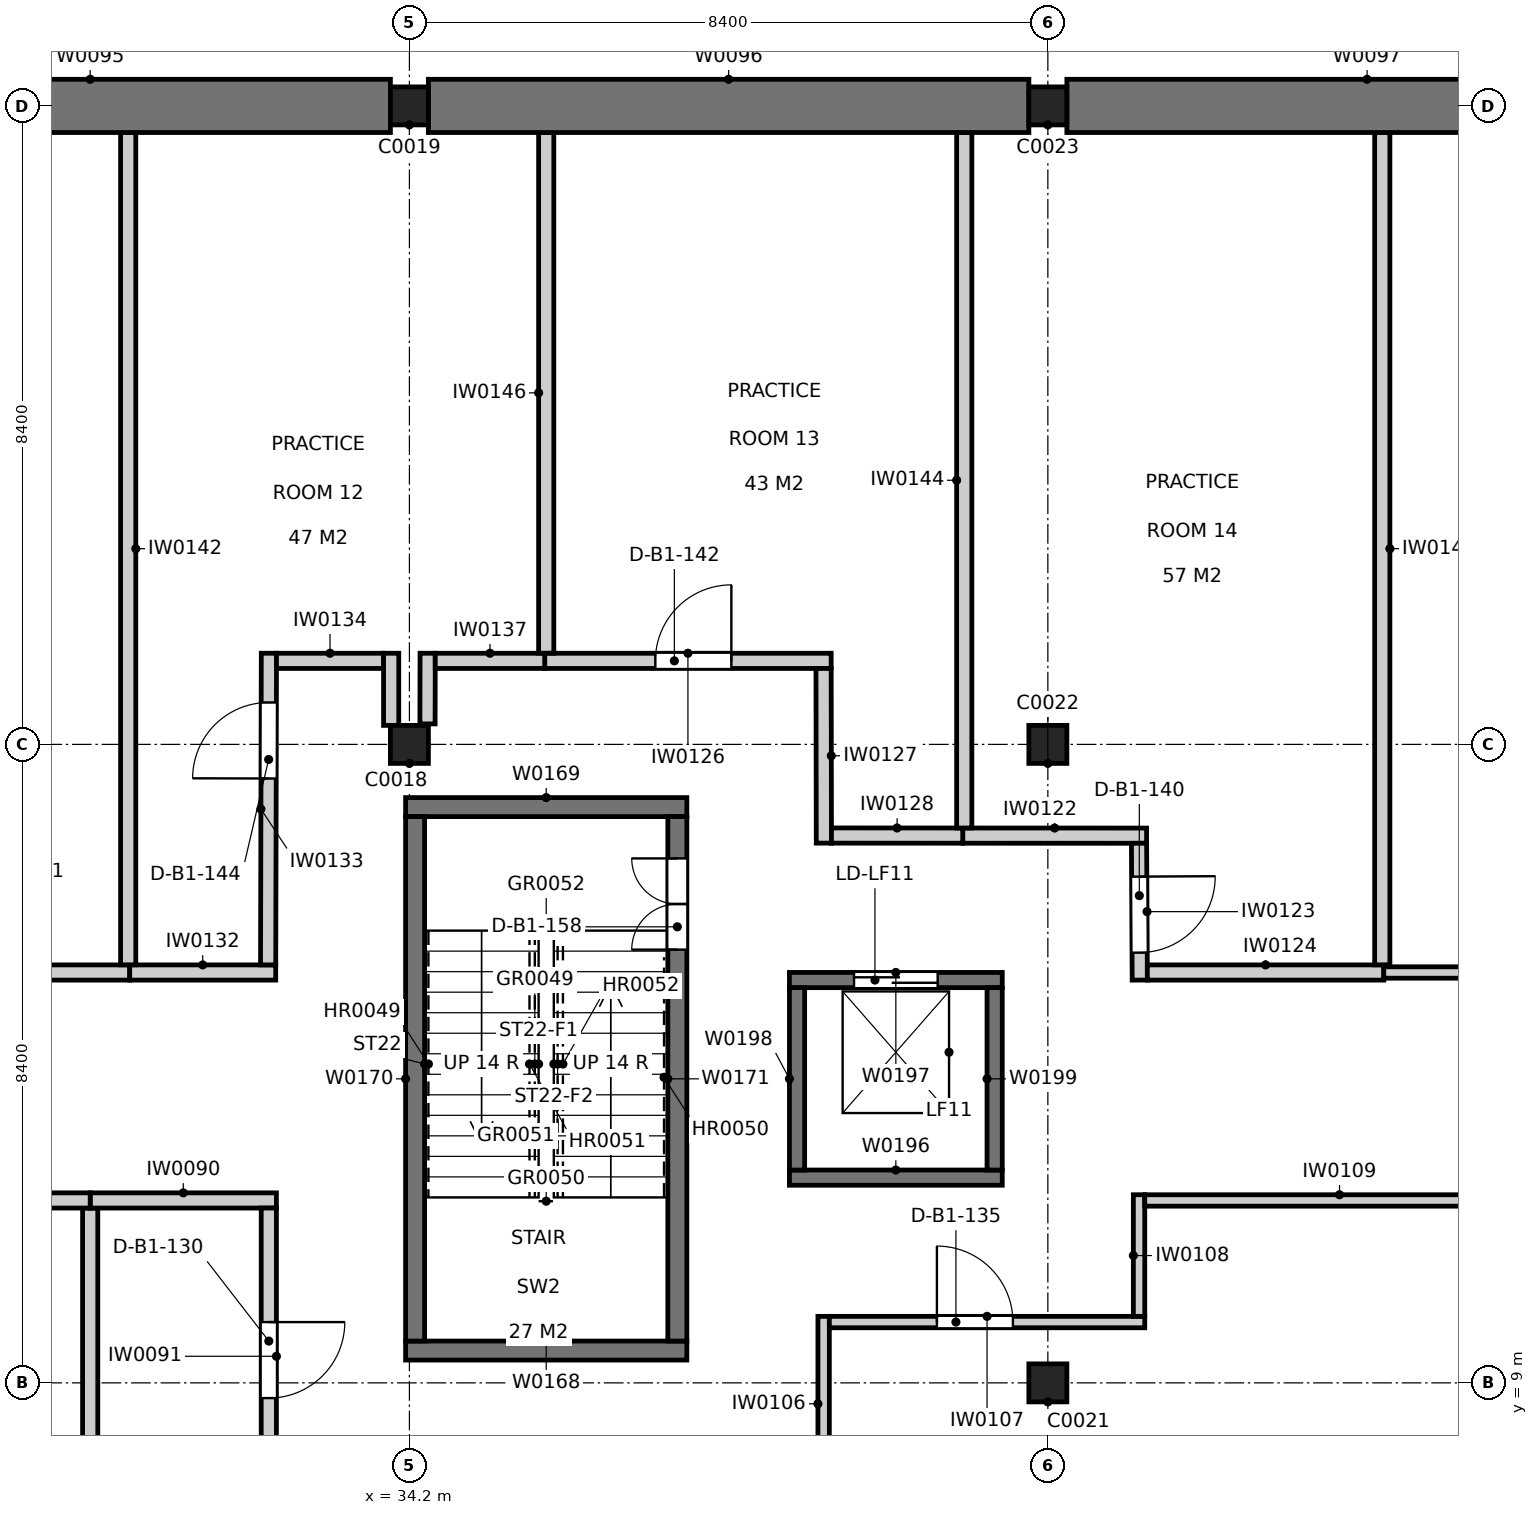
"""IFC4 building model, lengths in metres.
Left out: names, types, materials, properties, quantities, classifications, styles, units other than length and angle.
Written with IfcOpenShell. Run it as: python <this file> out.ifc"""

import sys

from ifc_helpers import new_model, si_unit, direction, frame, frame_2d, origin, origin_2d, place, context, subcontext, project, spatial, rectangle, extrude, element, fill, save


model = new_model("IFC4")
c1 = context("Model", 3, precision=1e-05, world=origin(), true_north=direction((0.0, 1.0)))
c2 = subcontext(c1, "Body", "Model", "MODEL_VIEW")
j1 = project(units=[si_unit("LENGTHUNIT", "METRE"), si_unit("PLANEANGLEUNIT", "RADIAN")], contexts=[c1])
p1 = place(None, origin())
s1 = spatial("IfcSite", under=j1, at=p1, CompositionType="ELEMENT")
p2 = place(p1, origin())
s2 = spatial("IfcBuilding", under=s1, at=p2, CompositionType="ELEMENT")
p3 = place(p2, frame((0.0, 0.0, -5.0)))
s3 = spatial("IfcBuildingStorey", under=s2, at=p3, CompositionType="ELEMENT", Elevation=-5.0)
for number, where, z_axis, x_axis in (
    (1, (34.2, 17.4, -0.5), (0.0, 0.0, 1.0), (1.0, 0.0, 0.0)),
    (2, (34.2, 25.8, -0.5), (0.0, 0.0, 1.0), (1.0, 0.0, 0.0)),
    (3, (42.6, 9.0, -0.5), (0.0, 0.0, 1.0), (1.0, 0.0, 0.0)),
    (4, (42.6, 17.4, -0.5), (0.0, 0.0, 1.0), (1.0, 0.0, 0.0)),
    (5, (42.6, 25.8, -0.5), (0.0, 0.0, 1.0), (1.0, 0.0, 0.0)),
):
    element("IfcColumn", number, at=place(p3, frame(where, z_axis=z_axis, x_axis=x_axis)), inside=s3, PredefinedType="COLUMN", context=c2, shape_type="SweptSolid", body=[
        extrude(rectangle(XDim=0.5, YDim=0.5, at=origin_2d()), origin(), (0.0, 0.0, 1.0), 5.5),
    ])
p4 = place(p3, frame((26.05, 25.8, 0.0), z_axis=(0.0, 0.0, 1.0), x_axis=(1.0, 0.0, 0.0)))
e6 = element("IfcWall", 6, at=p4, inside=s3, PredefinedType="SOLIDWALL", context=c2, shape_type="SweptSolid", body=[
    extrude(rectangle(XDim=7.9, YDim=0.7, at=frame_2d((3.95, 0.0))), origin(), (0.0, 0.0, 1.0), 5.0),
])
p5 = place(p3, frame((34.45, 25.8, 0.0), z_axis=(0.0, 0.0, 1.0), x_axis=(1.0, 0.0, 0.0)))
e7 = element("IfcWall", 7, at=p5, inside=s3, PredefinedType="SOLIDWALL", context=c2, shape_type="SweptSolid", body=[
    extrude(rectangle(XDim=7.9, YDim=0.7, at=frame_2d((3.95, 0.0))), origin(), (0.0, 0.0, 1.0), 5.0),
])
p6 = place(p3, frame((42.85, 25.8, 0.0), z_axis=(0.0, 0.0, 1.0), x_axis=(1.0, 0.0, 0.0)))
e8 = element("IfcWall", 8, at=p6, inside=s3, PredefinedType="SOLIDWALL", context=c2, shape_type="SweptSolid", body=[
    extrude(rectangle(XDim=7.9, YDim=0.7, at=frame_2d((3.95, 0.0))), origin(), (0.0, 0.0, 1.0), 5.0),
])
for number, where, z_axis, x_axis in (
    (9, (34.15, 9.425, 0.0), (0.0, 0.0, 1.0), (1.0, 0.0, 0.0)),
    (10, (34.15, 16.575, 0.0), (0.0, 0.0, 1.0), (1.0, 0.0, 0.0)),
):
    element("IfcWall", number, at=place(p3, frame(where, z_axis=z_axis, x_axis=x_axis)), inside=s3, PredefinedType="SOLIDWALL", context=c2, shape_type="SweptSolid", body=[
        extrude(rectangle(XDim=3.7, YDim=0.25, at=frame_2d((1.85, 0.0))), origin(), (0.0, 0.0, 1.0), 5.0),
    ])
p7 = place(p3, frame((34.275, 9.55, 0.0), z_axis=(0.0, 0.0, 1.0), x_axis=(0.0, 1.0, 0.0)))
e11 = element("IfcWall", 11, at=p7, inside=s3, PredefinedType="SOLIDWALL", context=c2, shape_type="SweptSolid", body=[
    extrude(rectangle(XDim=6.9, YDim=0.25, at=frame_2d((3.45, 0.0))), origin(), (0.0, 0.0, 1.0), 5.0),
])
p8 = place(p3, frame((37.725, 9.55, 0.0), z_axis=(0.0, 0.0, 1.0), x_axis=(0.0, 1.0, 0.0)))
e12 = element("IfcWall", 12, at=p8, inside=s3, PredefinedType="SOLIDWALL", context=c2, shape_type="SweptSolid", body=[
    extrude(rectangle(XDim=6.9, YDim=0.25, at=frame_2d((3.45, 0.0))), origin(), (0.0, 0.0, 1.0), 5.0),
])
p9 = place(p8, frame((5.15, 0.0, 0.0)))
e13 = element("IfcOpeningElement", 13, at=p9, cuts=e12, PredefinedType="OPENING", context=c2, shape_type="SweptSolid", body=[
    extrude(rectangle(XDim=1.2, YDim=2.1, at=frame_2d((0.6, 1.05))), frame((0.0, 0.135, 0.0), z_axis=(0.0, -1.0, 0.0), x_axis=(1.0, 0.0, 0.0)), (0.0, 0.0, 1.0), 0.27),
])
p10 = place(p3, frame((39.2, 11.7, -1.4), z_axis=(0.0, 0.0, 1.0), x_axis=(1.0, 0.0, 0.0)))
e14 = element("IfcWall", 14, at=p10, inside=s3, PredefinedType="SOLIDWALL", context=c2, shape_type="SweptSolid", body=[
    extrude(rectangle(XDim=2.8, YDim=0.2, at=frame_2d((1.4, 0.0))), origin(), (0.0, 0.0, 1.0), 6.4),
])
p11 = place(p3, frame((39.2, 14.3, -1.4), z_axis=(0.0, 0.0, 1.0), x_axis=(1.0, 0.0, 0.0)))
e15 = element("IfcWall", 15, at=p11, inside=s3, PredefinedType="SOLIDWALL", context=c2, shape_type="SweptSolid", body=[
    extrude(rectangle(XDim=2.8, YDim=0.2, at=frame_2d((1.4, 0.0))), origin(), (0.0, 0.0, 1.0), 6.4),
])
p12 = place(p11, frame((0.85, 0.0, 1.4)))
e16 = element("IfcOpeningElement", 16, at=p12, cuts=e15, PredefinedType="OPENING", context=c2, shape_type="SweptSolid", body=[
    extrude(rectangle(XDim=1.1, YDim=2.1, at=frame_2d((0.55, 1.05))), frame((0.0, 0.11, 0.0), z_axis=(0.0, -1.0, 0.0), x_axis=(1.0, 0.0, 0.0)), (0.0, 0.0, 1.0), 0.22),
])
for number, where, z_axis, x_axis in (
    (17, (39.3, 11.8, -1.4), (0.0, 0.0, 1.0), (0.0, 1.0, 0.0)),
    (18, (41.9, 11.8, -1.4), (0.0, 0.0, 1.0), (0.0, 1.0, 0.0)),
):
    element("IfcWall", number, at=place(p3, frame(where, z_axis=z_axis, x_axis=x_axis)), inside=s3, PredefinedType="SOLIDWALL", context=c2, shape_type="SweptSolid", body=[
        extrude(rectangle(XDim=2.4, YDim=0.2, at=frame_2d((1.2, 0.0))), origin(), (0.0, 0.0, 1.0), 6.4),
    ])
p13 = place(p3, frame((30.0, 0.95, 0.0), z_axis=(0.0, 0.0, 1.0), x_axis=(0.0, 1.0, 0.0)))
e19 = element("IfcWall", 19, at=p13, inside=s3, PredefinedType="PARTITIONING", context=c2, shape_type="SweptSolid", body=[
    extrude(rectangle(XDim=10.35, YDim=0.2, at=frame_2d((5.175, 0.0))), origin(), (0.0, 0.0, 1.0), 4.04),
])
p14 = place(p3, frame((30.0, 11.4, 0.0), z_axis=(0.0, 0.0, 1.0), x_axis=(1.0, 0.0, 0.0)))
e20 = element("IfcWall", 20, at=p14, inside=s3, PredefinedType="PARTITIONING", context=c2, shape_type="SweptSolid", body=[
    extrude(rectangle(XDim=2.45, YDim=0.2, at=frame_2d((1.225, 0.0))), origin(), (0.0, 0.0, 1.0), 4.84),
])
p15 = place(p3, frame((32.35, 11.3, 0.0), z_axis=(0.0, 0.0, 1.0), x_axis=(0.0, -1.0, 0.0)))
e21 = element("IfcWall", 21, at=p15, inside=s3, PredefinedType="PARTITIONING", context=c2, shape_type="SweptSolid", body=[
    extrude(rectangle(XDim=3.9, YDim=0.2, at=frame_2d((1.95, 0.0))), origin(), (0.0, 0.0, 1.0), 4.04),
])
p16 = place(p15, frame((1.5, 0.0, 0.0)))
e22 = element("IfcOpeningElement", 22, at=p16, cuts=e21, PredefinedType="OPENING", context=c2, shape_type="SweptSolid", body=[
    extrude(rectangle(XDim=1.0, YDim=2.1, at=frame_2d((0.5, 1.05))), frame((0.0, 0.11, 0.0), z_axis=(0.0, -1.0, 0.0), x_axis=(1.0, 0.0, 0.0)), (0.0, 0.0, 1.0), 0.22),
])
p17 = place(p3, frame((25.0, 11.4, 0.0), z_axis=(0.0, 0.0, 1.0), x_axis=(1.0, 0.0, 0.0)))
e23 = element("IfcWall", 23, at=p17, inside=s3, PredefinedType="PARTITIONING", context=c2, shape_type="SweptSolid", body=[
    extrude(rectangle(XDim=5.0, YDim=0.2, at=frame_2d((2.5, 0.0))), origin(), (0.0, 0.0, 1.0), 4.04),
])
p18 = place(p17, frame((1.99, 0.0, 0.0)))
e24 = element("IfcOpeningElement", 24, at=p18, cuts=e23, PredefinedType="OPENING", context=c2, shape_type="SweptSolid", body=[
    extrude(rectangle(XDim=1.0, YDim=2.1, at=frame_2d((0.5, 1.05))), frame((0.0, 0.11, 0.0), z_axis=(0.0, -1.0, 0.0), x_axis=(1.0, 0.0, 0.0)), (0.0, 0.0, 1.0), 0.22),
])
p19 = place(p3, frame((39.65, 7.575, 0.0), z_axis=(0.0, 0.0, 1.0), x_axis=(0.0, 1.0, 0.0)))
e25 = element("IfcWall", 25, at=p19, inside=s3, PredefinedType="PARTITIONING", context=c2, shape_type="SweptSolid", body=[
    extrude(rectangle(XDim=2.3, YDim=0.15, at=frame_2d((1.15, 0.0))), origin(), (0.0, 0.0, 1.0), 4.04),
])
p20 = place(p3, frame((39.725, 9.8, 0.0), z_axis=(0.0, 0.0, 1.0), x_axis=(1.0, 0.0, 0.0)))
e26 = element("IfcWall", 26, at=p20, inside=s3, PredefinedType="PARTITIONING", context=c2, shape_type="SweptSolid", body=[
    extrude(rectangle(XDim=4.15, YDim=0.15, at=frame_2d((2.075, 0.0))), origin(), (0.0, 0.0, 1.0), 4.04),
])
p21 = place(p20, frame((1.415, 0.0, 0.0)))
e27 = element("IfcOpeningElement", 27, at=p21, cuts=e26, PredefinedType="OPENING", context=c2, shape_type="SweptSolid", body=[
    extrude(rectangle(XDim=1.0, YDim=2.1, at=frame_2d((0.5, 1.05))), frame((0.0, 0.085, 0.0), z_axis=(0.0, -1.0, 0.0), x_axis=(1.0, 0.0, 0.0)), (0.0, 0.0, 1.0), 0.17),
])
p22 = place(p3, frame((43.8, 9.875, 0.0), z_axis=(0.0, 0.0, 1.0), x_axis=(0.0, 1.0, 0.0)))
e28 = element("IfcWall", 28, at=p22, inside=s3, PredefinedType="PARTITIONING", context=c2, shape_type="SweptSolid", body=[
    extrude(rectangle(XDim=1.6, YDim=0.15, at=frame_2d((0.8, 0.0))), origin(), (0.0, 0.0, 1.0), 4.84),
])
p23 = place(p3, frame((43.875, 11.4, 0.0), z_axis=(0.0, 0.0, 1.0), x_axis=(1.0, 0.0, 0.0)))
e29 = element("IfcWall", 29, at=p23, inside=s3, PredefinedType="PARTITIONING", context=c2, shape_type="SweptSolid", body=[
    extrude(rectangle(XDim=5.125, YDim=0.15, at=frame_2d((2.562, 0.0))), origin(), (0.0, 0.0, 1.0), 4.84),
])
p24 = place(p3, frame((25.02, 14.399, 0.0), z_axis=(0.0, 0.0, 1.0), x_axis=(1.0, 0.0, 0.0)))
e30 = element("IfcWall", 30, at=p24, inside=s3, PredefinedType="PARTITIONING", context=c2, shape_type="SweptSolid", body=[
    extrude(rectangle(XDim=5.5, YDim=0.2, at=frame_2d((2.75, 0.0))), origin(), (0.0, 0.0, 1.0), 4.04),
])
p25 = place(p24, frame((2.22, 0.0, 0.0)))
e31 = element("IfcOpeningElement", 31, at=p25, cuts=e30, PredefinedType="OPENING", context=c2, shape_type="SweptSolid", body=[
    extrude(rectangle(XDim=1.0, YDim=2.1, at=frame_2d((0.5, 1.05))), frame((0.0, 0.11, 0.0), z_axis=(0.0, -1.0, 0.0), x_axis=(1.0, 0.0, 0.0)), (0.0, 0.0, 1.0), 0.22),
])
p26 = place(p3, frame((41.48, 16.2, 0.0), z_axis=(0.0, 0.0, 1.0), x_axis=(0.999999918507, -0.000403714137, 0.0)))
e32 = element("IfcWall", 32, at=p26, inside=s3, PredefinedType="PARTITIONING", context=c2, shape_type="SweptSolid", body=[
    extrude(rectangle(XDim=2.419, YDim=0.2, at=frame_2d((1.209, 0.0))), origin(), (0.0, 0.0, 1.0), 4.04),
])
p27 = place(p3, frame((43.8, 16.099, 0.0), z_axis=(0.0, 0.0, 1.0), x_axis=(0.005560744079, -0.999984538943, 0.0)))
e33 = element("IfcWall", 33, at=p27, inside=s3, PredefinedType="PARTITIONING", context=c2, shape_type="SweptSolid", body=[
    extrude(rectangle(XDim=1.8, YDim=0.2, at=frame_2d((0.9, 0.0))), origin(), (0.0, 0.0, 1.0), 4.24),
])
p28 = place(p27, frame((0.439, 0.0, 0.0)))
e34 = element("IfcOpeningElement", 34, at=p28, cuts=e33, PredefinedType="OPENING", context=c2, shape_type="SweptSolid", body=[
    extrude(rectangle(XDim=1.0, YDim=2.1, at=frame_2d((0.5, 1.05))), frame((0.0, 0.11, 0.0), z_axis=(0.0, -1.0, 0.0), x_axis=(1.0, 0.0, 0.0)), (0.0, 0.0, 1.0), 0.22),
])
p29 = place(p3, frame((43.909, 14.399, 0.0), z_axis=(0.0, 0.0, 1.0), x_axis=(1.0, 0.0, 0.0)))
e35 = element("IfcWall", 35, at=p29, inside=s3, PredefinedType="PARTITIONING", context=c2, shape_type="SweptSolid", body=[
    extrude(rectangle(XDim=3.111, YDim=0.2, at=frame_2d((1.556, 0.0))), origin(), (0.0, 0.0, 1.0), 4.24),
])
p30 = place(p3, frame((47.02, 14.399, 0.0), z_axis=(0.0, 0.0, 1.0), x_axis=(0.999999995232, 9.765625e-05, 0.0)))
e36 = element("IfcWall", 36, at=p30, inside=s3, PredefinedType="PARTITIONING", context=c2, shape_type="SweptSolid", body=[
    extrude(rectangle(XDim=10.0, YDim=0.15, at=frame_2d((5.0, 0.0))), origin(), (0.0, 0.0, 1.0), 4.04),
])
p31 = place(p30, frame((4.47, 0.0, 0.0)))
e37 = element("IfcOpeningElement", 37, at=p31, cuts=e36, PredefinedType="OPENING", context=c2, shape_type="SweptSolid", body=[
    extrude(rectangle(XDim=1.0, YDim=2.1, at=frame_2d((0.5, 1.05))), frame((0.0, 0.085, 0.0), z_axis=(0.0, -1.0, 0.0), x_axis=(1.0, 0.0, 0.0)), (0.0, 0.0, 1.0), 0.17),
])
p32 = place(p3, frame((35.98, 18.499, 0.0), z_axis=(0.0, 0.0, 1.0), x_axis=(1.0, 0.0, 0.0)))
e38 = element("IfcWall", 38, at=p32, inside=s3, PredefinedType="PARTITIONING", context=c2, shape_type="SweptSolid", body=[
    extrude(rectangle(XDim=3.769, YDim=0.2, at=frame_2d((1.885, 0.0))), origin(), (0.0, 0.0, 1.0), 4.84),
])
p33 = place(p32, frame((1.456, 0.0, 0.0)))
e39 = element("IfcOpeningElement", 39, at=p33, cuts=e38, PredefinedType="OPENING", context=c2, shape_type="SweptSolid", body=[
    extrude(rectangle(XDim=1.0, YDim=2.1, at=frame_2d((0.5, 1.05))), frame((0.0, 0.11, 0.0), z_axis=(0.0, -1.0, 0.0), x_axis=(1.0, 0.0, 0.0)), (0.0, 0.0, 1.0), 0.22),
])
p34 = place(p3, frame((39.649, 18.399, 0.0), z_axis=(0.0, 0.0, 1.0), x_axis=(0.001699955045, -0.999998555075, 0.0)))
e40 = element("IfcWall", 40, at=p34, inside=s3, PredefinedType="PARTITIONING", context=c2, shape_type="SweptSolid", body=[
    extrude(rectangle(XDim=2.298, YDim=0.2, at=frame_2d((1.149, 0.0))), origin(), (0.0, 0.0, 1.0), 4.04),
])
p35 = place(p3, frame((39.753, 16.201, 0.0), z_axis=(0.0, 0.0, 1.0), x_axis=(0.999999840133, -0.000565450857, 0.0)))
e41 = element("IfcWall", 41, at=p35, inside=s3, PredefinedType="PARTITIONING", context=c2, shape_type="SweptSolid", body=[
    extrude(rectangle(XDim=1.727, YDim=0.2, at=frame_2d((0.864, 0.0))), origin(), (0.0, 0.0, 1.0), 4.84),
])
p36 = place(p3, frame((30.52, 14.399, 0.0), z_axis=(0.0, 0.0, 1.0), x_axis=(1.0, 0.0, 0.0)))
e42 = element("IfcWall", 42, at=p36, inside=s3, PredefinedType="PARTITIONING", context=c2, shape_type="SweptSolid", body=[
    extrude(rectangle(XDim=1.921, YDim=0.2, at=frame_2d((0.96, 0.0))), origin(), (0.0, 0.0, 1.0), 4.24),
])
p37 = place(p3, frame((32.341, 14.499, 0.0), z_axis=(0.0, 0.0, 1.0), x_axis=(0.002441340825, 0.999997019923, 0.0)))
e43 = element("IfcWall", 43, at=p37, inside=s3, PredefinedType="PARTITIONING", context=c2, shape_type="SweptSolid", body=[
    extrude(rectangle(XDim=4.1, YDim=0.2, at=frame_2d((2.05, 0.0))), origin(), (0.0, 0.0, 1.0), 4.04),
])
p38 = place(p37, frame((2.452, 0.0, 0.0)))
e44 = element("IfcOpeningElement", 44, at=p38, cuts=e43, PredefinedType="OPENING", context=c2, shape_type="SweptSolid", body=[
    extrude(rectangle(XDim=1.0, YDim=2.1, at=frame_2d((0.5, 1.05))), frame((0.0, 0.11, 0.0), z_axis=(0.0, -1.0, 0.0), x_axis=(1.0, 0.0, 0.0)), (0.0, 0.0, 1.0), 0.22),
])
p39 = place(p3, frame((32.451, 18.499, 0.0), z_axis=(0.0, 0.0, 1.0), x_axis=(1.0, 0.0, 0.0)))
e45 = element("IfcWall", 45, at=p39, inside=s3, PredefinedType="PARTITIONING", context=c2, shape_type="SweptSolid", body=[
    extrude(rectangle(XDim=1.409, YDim=0.2, at=frame_2d((0.705, 0.0))), origin(), (0.0, 0.0, 1.0), 4.84),
])
p40 = place(p3, frame((33.96, 18.599, 0.0), z_axis=(0.0, 0.0, 1.0), x_axis=(0.0, -1.0, 0.0)))
e46 = element("IfcWall", 46, at=p40, inside=s3, PredefinedType="PARTITIONING", context=c2, shape_type="SweptSolid", body=[
    extrude(rectangle(XDim=0.949, YDim=0.2, at=frame_2d((0.475, 0.0))), origin(), (0.0, 0.0, 1.0), 4.04),
])
p41 = place(p3, frame((34.438, 17.67, 0.0), z_axis=(0.0, 0.0, 1.0), x_axis=(0.002364680724, 0.999997204139, 0.0)))
e47 = element("IfcWall", 47, at=p41, inside=s3, PredefinedType="PARTITIONING", context=c2, shape_type="SweptSolid", body=[
    extrude(rectangle(XDim=0.929, YDim=0.2, at=frame_2d((0.465, 0.0))), origin(), (0.0, 0.0, 1.0), 4.04),
])
p42 = place(p3, frame((34.54, 18.499, 0.0), z_axis=(0.0, 0.0, 1.0), x_axis=(1.0, 0.0, 0.0)))
e48 = element("IfcWall", 48, at=p42, inside=s3, PredefinedType="PARTITIONING", context=c2, shape_type="SweptSolid", body=[
    extrude(rectangle(XDim=1.44, YDim=0.2, at=frame_2d((0.72, 0.0))), origin(), (0.0, 0.0, 1.0), 4.84),
])
for number, where, z_axis, x_axis in (
    (49, (30.5, 25.45, 0.0), (0.0, 0.0, 1.0), (0.0, -1.0, 0.0)),
    (50, (47.0, 25.45, 0.0), (0.0, 0.0, 1.0), (0.0, -1.0, 0.0)),
):
    element("IfcWall", number, at=place(p3, frame(where, z_axis=z_axis, x_axis=x_axis)), inside=s3, PredefinedType="PARTITIONING", context=c2, shape_type="SweptSolid", body=[
        extrude(rectangle(XDim=10.95, YDim=0.2, at=frame_2d((5.475, 0.0))), origin(), (0.0, 0.0, 1.0), 4.04),
    ])
p43 = place(p3, frame((41.5, 16.3, 0.0), z_axis=(0.0, 0.0, 1.0), x_axis=(0.0, 1.0, 0.0)))
e51 = element("IfcWall", 51, at=p43, inside=s3, PredefinedType="PARTITIONING", context=c2, shape_type="SweptSolid", body=[
    extrude(rectangle(XDim=9.15, YDim=0.2, at=frame_2d((4.575, 0.0))), origin(), (0.0, 0.0, 1.0), 4.04),
])
p44 = place(p3, frame((36.0, 18.6, 0.0), z_axis=(0.0, 0.0, 1.0), x_axis=(0.0, 1.0, 0.0)))
e52 = element("IfcWall", 52, at=p44, inside=s3, PredefinedType="PARTITIONING", context=c2, shape_type="SweptSolid", body=[
    extrude(rectangle(XDim=6.85, YDim=0.2, at=frame_2d((3.425, 0.0))), origin(), (0.0, 0.0, 1.0), 4.24),
])
p45 = place(p16, origin())
e53 = element("IfcDoor", 53, at=p45, inside=s3, OperationType="SINGLE_SWING_LEFT", PredefinedType="DOOR", context=c2, shape_type="SweptSolid", body=[
    extrude(rectangle(XDim=1.0, YDim=2.1, at=frame_2d((0.5, 1.05))), frame((0.0, 0.025, 0.0), z_axis=(0.0, -1.0, 0.0), x_axis=(1.0, 0.0, 0.0)), (0.0, 0.0, 1.0), 0.05),
])
fill(e22, e53)
p46 = place(p21, origin())
e54 = element("IfcDoor", 54, at=p46, inside=s3, OperationType="SINGLE_SWING_LEFT", PredefinedType="DOOR", context=c2, shape_type="SweptSolid", body=[
    extrude(rectangle(XDim=1.0, YDim=2.1, at=frame_2d((0.5, 1.05))), frame((0.0, 0.025, 0.0), z_axis=(0.0, -1.0, 0.0), x_axis=(1.0, 0.0, 0.0)), (0.0, 0.0, 1.0), 0.05),
])
fill(e27, e54)
p47 = place(p28, origin())
e55 = element("IfcDoor", 55, at=p47, inside=s3, OperationType="SINGLE_SWING_LEFT", PredefinedType="DOOR", context=c2, shape_type="SweptSolid", body=[
    extrude(rectangle(XDim=1.0, YDim=2.1, at=frame_2d((0.5, 1.05))), frame((0.0, 0.025, 0.0), z_axis=(0.0, -1.0, 0.0), x_axis=(1.0, 0.0, 0.0)), (0.0, 0.0, 1.0), 0.05),
])
fill(e34, e55)
p48 = place(p33, origin())
e56 = element("IfcDoor", 56, at=p48, inside=s3, OperationType="SINGLE_SWING_RIGHT", PredefinedType="DOOR", context=c2, shape_type="SweptSolid", body=[
    extrude(rectangle(XDim=1.0, YDim=2.1, at=frame_2d((0.5, 1.05))), frame((0.0, 0.025, 0.0), z_axis=(0.0, -1.0, 0.0), x_axis=(1.0, 0.0, 0.0)), (0.0, 0.0, 1.0), 0.05),
])
fill(e39, e56)
p49 = place(p38, origin())
e57 = element("IfcDoor", 57, at=p49, inside=s3, OperationType="SINGLE_SWING_LEFT", PredefinedType="DOOR", context=c2, shape_type="SweptSolid", body=[
    extrude(rectangle(XDim=1.0, YDim=2.1, at=frame_2d((0.5, 1.05))), frame((0.0, 0.025, 0.0), z_axis=(0.0, -1.0, 0.0), x_axis=(1.0, 0.0, 0.0)), (0.0, 0.0, 1.0), 0.05),
])
fill(e44, e57)
p50 = place(p9, origin())
e58 = element("IfcDoor", 58, at=p50, inside=s3, OperationType="DOUBLE_DOOR_SINGLE_SWING", PredefinedType="DOOR", context=c2, shape_type="SweptSolid", body=[
    extrude(rectangle(XDim=1.2, YDim=2.1, at=frame_2d((0.6, 1.05))), frame((0.0, 0.025, 0.0), z_axis=(0.0, -1.0, 0.0), x_axis=(1.0, 0.0, 0.0)), (0.0, 0.0, 1.0), 0.05),
])
fill(e13, e58)
p51 = place(p12, origin())
e59 = element("IfcDoor", 59, at=p51, inside=s3, OperationType="SLIDING_TO_LEFT", PredefinedType="DOOR", context=c2, shape_type="SweptSolid", body=[
    extrude(rectangle(XDim=1.1, YDim=2.1, at=frame_2d((0.55, 1.05))), frame((0.0, 0.025, 0.0), z_axis=(0.0, -1.0, 0.0), x_axis=(1.0, 0.0, 0.0)), (0.0, 0.0, 1.0), 0.05),
])
fill(e16, e59)
save(model, sys.argv[1])
